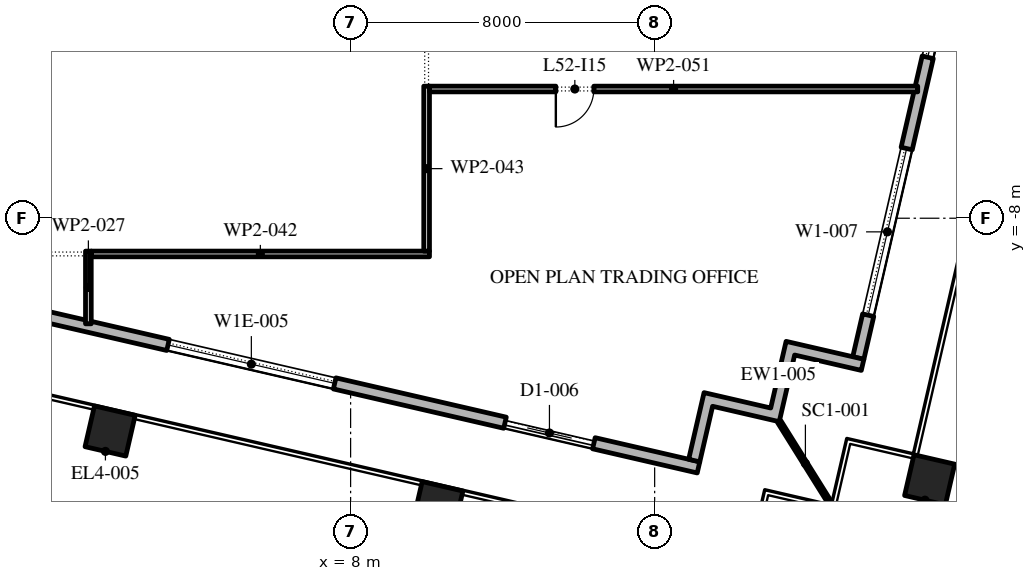
"""IFC4 building model, lengths in metres.
Left out: names, types, materials, properties, quantities, classifications, styles, units other than length and angle.
Written with IfcOpenShell. Run it as: python <this file> out.ifc"""

import sys

from ifc_helpers import new_model, si_unit, direction, frame, frame_2d, origin, origin_2d, place, context, subcontext, project, spatial, polyline, rectangle, outline, extrude, element, fill, save


model = new_model("IFC4")
c1 = context("Model", 3, precision=1e-05, world=origin(), true_north=direction((0.0, 1.0)))
c2 = subcontext(c1, "Body", "Model", "MODEL_VIEW")
j1 = project(units=[si_unit("LENGTHUNIT", "METRE"), si_unit("PLANEANGLEUNIT", "RADIAN")], contexts=[c1])
p1 = place(None, origin())
s1 = spatial("IfcSite", under=j1, at=p1, CompositionType="ELEMENT")
p2 = place(p1, origin())
s2 = spatial("IfcBuilding", under=s1, at=p2, CompositionType="ELEMENT")
p3 = place(p2, frame((0.0, 0.0, 243.0)))
s3 = spatial("IfcBuildingStorey", under=s2, at=p3, CompositionType="ELEMENT", Elevation=243.0)
for number, where, z_axis, x_axis in (
    (1, (1.672, -13.599, 0.0), (0.0, 0.0, 1.0), (0.974, -0.225, 0.0)),
    (2, (10.295, -15.59, 0.0), (0.0, 0.0, 1.0), (0.974, -0.225, 0.0)),
    (3, (23.236, -14.883, 0.0), (0.0, 0.0, 1.0), (0.974, -0.225, 0.0)),
):
    element("IfcColumn", number, at=place(p3, frame(where, z_axis=z_axis, x_axis=x_axis)), inside=s3, PredefinedType="COLUMN", context=c2, shape_type="SweptSolid", body=[
        extrude(rectangle(XDim=1.1, YDim=1.1, at=origin_2d()), origin(), (0.0, 0.0, 1.0), 4.2),
    ])
p4 = place(p3, frame((-29.616, -3.758, 0.0), z_axis=(0.0, 0.0, 1.0), x_axis=(0.974370532314, -0.224949029246, 0.0)))
e4 = element("IfcWall", 4, at=p4, inside=s3, PredefinedType="STANDARD", context=c2, shape_type="SweptSolid", body=[
    extrude(rectangle(XDim=48.0, YDim=0.3, at=frame_2d((24.0, 0.0))), origin(), (0.0, 0.0, 1.0), 4.0),
])
p5 = place(p4, frame((1.625, 0.0, 0.45)))
e5 = element("IfcOpeningElement", 5, at=p5, cuts=e4, PredefinedType="OPENING", context=c2, shape_type="SweptSolid", body=[
    extrude(rectangle(XDim=4.5, YDim=3.05, at=frame_2d((2.25, 1.525))), frame((0.0, 0.16, 0.0), z_axis=(0.0, -1.0, 0.0), x_axis=(1.0, 0.0, 0.0)), (0.0, 0.0, 1.0), 0.32),
])
p6 = place(p4, frame((10.575, 0.0, 0.0)))
e6 = element("IfcOpeningElement", 6, at=p6, cuts=e4, PredefinedType="OPENING", context=c2, shape_type="SweptSolid", body=[
    extrude(rectangle(XDim=2.4, YDim=3.5, at=frame_2d((1.2, 1.75))), frame((0.0, 0.16, 0.0), z_axis=(0.0, -1.0, 0.0), x_axis=(1.0, 0.0, 0.0)), (0.0, 0.0, 1.0), 0.32),
])
p7 = place(p4, frame((17.575, 0.0, 0.45)))
e7 = element("IfcOpeningElement", 7, at=p7, cuts=e4, PredefinedType="OPENING", context=c2, shape_type="SweptSolid", body=[
    extrude(rectangle(XDim=4.5, YDim=3.0, at=frame_2d((2.25, 1.5))), frame((0.0, 0.16, 0.0), z_axis=(0.0, -1.0, 0.0), x_axis=(1.0, 0.0, 0.0)), (0.0, 0.0, 1.0), 0.32),
])
p8 = place(p4, frame((25.625, 0.0, 0.45)))
e8 = element("IfcOpeningElement", 8, at=p8, cuts=e4, PredefinedType="OPENING", context=c2, shape_type="SweptSolid", body=[
    extrude(rectangle(XDim=4.5, YDim=3.05, at=frame_2d((2.25, 1.525))), frame((0.0, 0.16, 0.0), z_axis=(0.0, -1.0, 0.0), x_axis=(1.0, 0.0, 0.0)), (0.0, 0.0, 1.0), 0.32),
])
p9 = place(p4, frame((33.675, 0.0, 0.45)))
e9 = element("IfcOpeningElement", 9, at=p9, cuts=e4, PredefinedType="OPENING", context=c2, shape_type="SweptSolid", body=[
    extrude(rectangle(XDim=4.5, YDim=2.825, at=frame_2d((2.25, 1.413))), frame((0.0, 0.16, 0.0), z_axis=(0.0, -1.0, 0.0), x_axis=(1.0, 0.0, 0.0)), (0.0, 0.0, 1.0), 0.32),
])
p10 = place(p4, frame((42.775, 0.0, 0.0)))
e10 = element("IfcOpeningElement", 10, at=p10, cuts=e4, PredefinedType="OPENING", context=c2, shape_type="SweptSolid", body=[
    extrude(rectangle(XDim=2.4, YDim=3.5, at=frame_2d((1.2, 1.75))), frame((0.0, 0.16, 0.0), z_axis=(0.0, -1.0, 0.0), x_axis=(1.0, 0.0, 0.0)), (0.0, 0.0, 1.0), 0.32),
])
p11 = place(p3, frame((21.359, -11.678, 0.0), z_axis=(0.0, 0.0, 1.0), x_axis=(0.224949198343, 0.974370493275, 0.0)))
e11 = element("IfcWall", 11, at=p11, inside=s3, PredefinedType="STANDARD", context=c2, shape_type="SweptSolid", body=[
    extrude(rectangle(XDim=49.5, YDim=0.3, at=frame_2d((24.75, 0.0))), origin(), (0.0, 0.0, 1.0), 4.0),
])
p12 = place(p11, frame((1.157, 0.0, 0.45)))
e12 = element("IfcOpeningElement", 12, at=p12, cuts=e11, PredefinedType="OPENING", context=c2, shape_type="SweptSolid", body=[
    extrude(rectangle(XDim=4.5, YDim=3.05, at=frame_2d((2.25, 1.525))), frame((0.0, 0.16, 0.0), z_axis=(0.0, -1.0, 0.0), x_axis=(1.0, 0.0, 0.0)), (0.0, 0.0, 1.0), 0.32),
])
p13 = place(p11, frame((8.121, 0.0, 0.45)))
e13 = element("IfcOpeningElement", 13, at=p13, cuts=e11, PredefinedType="OPENING", context=c2, shape_type="SweptSolid", body=[
    extrude(rectangle(XDim=4.5, YDim=3.05, at=frame_2d((2.25, 1.525))), frame((0.0, 0.16, 0.0), z_axis=(0.0, -1.0, 0.0), x_axis=(1.0, 0.0, 0.0)), (0.0, 0.0, 1.0), 0.32),
])
p14 = place(p11, frame((15.236, 0.0, 0.45)))
e14 = element("IfcOpeningElement", 14, at=p14, cuts=e11, PredefinedType="OPENING", context=c2, shape_type="SweptSolid", body=[
    extrude(rectangle(XDim=4.5, YDim=3.05, at=frame_2d((2.25, 1.525))), frame((0.0, 0.16, 0.0), z_axis=(0.0, -1.0, 0.0), x_axis=(1.0, 0.0, 0.0)), (0.0, 0.0, 1.0), 0.32),
])
p15 = place(p11, frame((22.35, 0.0, 0.45)))
e15 = element("IfcOpeningElement", 15, at=p15, cuts=e11, PredefinedType="OPENING", context=c2, shape_type="SweptSolid", body=[
    extrude(rectangle(XDim=4.5, YDim=3.05, at=frame_2d((2.25, 1.525))), frame((0.0, 0.16, 0.0), z_axis=(0.0, -1.0, 0.0), x_axis=(1.0, 0.0, 0.0)), (0.0, 0.0, 1.0), 0.32),
])
p16 = place(p11, frame((29.464, 0.0, 0.45)))
e16 = element("IfcOpeningElement", 16, at=p16, cuts=e11, PredefinedType="OPENING", context=c2, shape_type="SweptSolid", body=[
    extrude(rectangle(XDim=4.5, YDim=2.95, at=frame_2d((2.25, 1.475))), frame((0.0, 0.16, 0.0), z_axis=(0.0, -1.0, 0.0), x_axis=(1.0, 0.0, 0.0)), (0.0, 0.0, 1.0), 0.32),
])
p17 = place(p11, frame((37.628, 0.0, 0.0)))
e17 = element("IfcOpeningElement", 17, at=p17, cuts=e11, PredefinedType="OPENING", context=c2, shape_type="SweptSolid", body=[
    extrude(rectangle(XDim=2.4, YDim=3.325, at=frame_2d((1.2, 1.663))), frame((0.0, 0.16, 0.0), z_axis=(0.0, -1.0, 0.0), x_axis=(1.0, 0.0, 0.0)), (0.0, 0.0, 1.0), 0.32),
])
p18 = place(p11, frame((43.693, 0.0, 0.45)))
e18 = element("IfcOpeningElement", 18, at=p18, cuts=e11, PredefinedType="OPENING", context=c2, shape_type="SweptSolid", body=[
    extrude(rectangle(XDim=4.5, YDim=3.05, at=frame_2d((2.25, 1.525))), frame((0.0, 0.16, 0.0), z_axis=(0.0, -1.0, 0.0), x_axis=(1.0, 0.0, 0.0)), (0.0, 0.0, 1.0), 0.32),
])
p19 = place(p3, origin())
e19 = element("IfcWall", 19, at=p19, inside=s3, PredefinedType="STANDARD", context=c2, shape_type="SweptSolid", body=[
    extrude(outline(polyline([(19.054, -12.993), (19.459, -11.24), (21.505, -11.712), (21.438, -12.004), (19.684, -11.599), (19.279, -13.353), (17.525, -12.948), (17.188, -14.41), (16.895, -14.342), (17.3, -12.588), (19.054, -12.993)])), origin(), (0.0, 0.0, 1.0), 4.0),
])
p20 = place(p3, frame((19.279, -13.353, -0.05), z_axis=(0.0, 0.0, 1.0), x_axis=(0.529914407191, -0.848051131154, 0.0)))
e20 = element("IfcWall", 20, at=p20, inside=s3, PredefinedType="STANDARD", context=c2, shape_type="SweptSolid", body=[
    extrude(rectangle(XDim=2.596, YDim=0.1, at=frame_2d((1.298, 0.0))), origin(), (0.0, 0.0, 1.0), 4.05),
])
p21 = place(p3, frame((1.1, -8.865, 0.0), z_axis=(0.0, 0.0, 1.0), x_axis=(0.0, -1.0, 0.0)))
e21 = element("IfcWall", 21, at=p21, inside=s3, PredefinedType="PARTITIONING", context=c2, shape_type="SweptSolid", body=[
    extrude(rectangle(XDim=1.913, YDim=0.15, at=frame_2d((0.957, 0.0))), origin(), (0.0, 0.0, 1.0), 4.0),
])
p22 = place(p3, frame((10.075, -8.94, 0.0), z_axis=(0.0, 0.0, 1.0), x_axis=(-1.0, 0.0, 0.0)))
e22 = element("IfcWall", 22, at=p22, inside=s3, PredefinedType="PARTITIONING", context=c2, shape_type="SweptSolid", body=[
    extrude(rectangle(XDim=8.9, YDim=0.15, at=frame_2d((4.45, 0.0))), origin(), (0.0, 0.0, 1.0), 4.0),
])
p23 = place(p3, frame((10.0, -4.525, 0.0), z_axis=(0.0, 0.0, 1.0), x_axis=(0.0, -1.0, 0.0)))
e23 = element("IfcWall", 23, at=p23, inside=s3, PredefinedType="PARTITIONING", context=c2, shape_type="SweptSolid", body=[
    extrude(rectangle(XDim=4.34, YDim=0.15, at=frame_2d((2.17, 0.0))), origin(), (0.0, 0.0, 1.0), 4.0),
])
p24 = place(p3, frame((22.922, -4.6, 0.0), z_axis=(0.0, 0.0, 1.0), x_axis=(-1.0, 0.0, 0.0)))
e24 = element("IfcWall", 24, at=p24, inside=s3, PredefinedType="PARTITIONING", context=c2, shape_type="SweptSolid", body=[
    extrude(rectangle(XDim=12.847, YDim=0.15, at=frame_2d((6.424, 0.0))), origin(), (0.0, 0.0, 1.0), 4.0),
])
p25 = place(p24, frame((8.522, 0.0, 0.0)))
e25 = element("IfcOpeningElement", 25, at=p25, cuts=e24, PredefinedType="OPENING", context=c2, shape_type="SweptSolid", body=[
    extrude(rectangle(XDim=1.0, YDim=2.1, at=frame_2d((0.5, 1.05))), frame((0.0, 0.085, 0.0), z_axis=(0.0, -1.0, 0.0), x_axis=(1.0, 0.0, 0.0)), (0.0, 0.0, 1.0), 0.17),
])
p26 = place(p9, origin())
e26 = element("IfcWindow", 26, at=p26, inside=s3, PartitioningType="DOUBLE_PANEL_VERTICAL", PredefinedType="WINDOW", context=c2, shape_type="SweptSolid", body=[
    extrude(rectangle(XDim=4.5, YDim=2.825, at=frame_2d((2.25, 1.413))), frame((0.0, 0.03, 0.0), z_axis=(0.0, -1.0, 0.0), x_axis=(1.0, 0.0, 0.0)), (0.0, 0.0, 1.0), 0.06),
])
fill(e9, e26)
p27 = place(p10, origin())
e27 = element("IfcDoor", 27, at=p27, inside=s3, OperationType="DOUBLE_DOOR_SLIDING", PredefinedType="DOOR", context=c2, shape_type="SweptSolid", body=[
    extrude(rectangle(XDim=2.4, YDim=3.5, at=frame_2d((1.2, 1.75))), frame((0.0, 0.025, 0.0), z_axis=(0.0, -1.0, 0.0), x_axis=(1.0, 0.0, 0.0)), (0.0, 0.0, 1.0), 0.05),
])
fill(e10, e27)
p28 = place(p12, origin())
e28 = element("IfcWindow", 28, at=p28, inside=s3, PartitioningType="DOUBLE_PANEL_VERTICAL", PredefinedType="WINDOW", context=c2, shape_type="SweptSolid", body=[
    extrude(rectangle(XDim=4.5, YDim=3.05, at=frame_2d((2.25, 1.525))), frame((0.0, 0.03, 0.0), z_axis=(0.0, -1.0, 0.0), x_axis=(1.0, 0.0, 0.0)), (0.0, 0.0, 1.0), 0.06),
])
fill(e12, e28)
p29 = place(p13, origin())
e29 = element("IfcWindow", 29, at=p29, inside=s3, PartitioningType="DOUBLE_PANEL_VERTICAL", PredefinedType="WINDOW", context=c2, shape_type="SweptSolid", body=[
    extrude(rectangle(XDim=4.5, YDim=3.05, at=frame_2d((2.25, 1.525))), frame((0.0, 0.03, 0.0), z_axis=(0.0, -1.0, 0.0), x_axis=(1.0, 0.0, 0.0)), (0.0, 0.0, 1.0), 0.06),
])
fill(e13, e29)
p30 = place(p25, origin())
e30 = element("IfcDoor", 30, at=p30, inside=s3, OperationType="SINGLE_SWING_LEFT", PredefinedType="DOOR", context=c2, shape_type="SweptSolid", body=[
    extrude(rectangle(XDim=1.0, YDim=2.1, at=frame_2d((0.5, 1.05))), frame((0.0, 0.025, 0.0), z_axis=(0.0, -1.0, 0.0), x_axis=(1.0, 0.0, 0.0)), (0.0, 0.0, 1.0), 0.05),
])
fill(e25, e30)
save(model, sys.argv[1])
